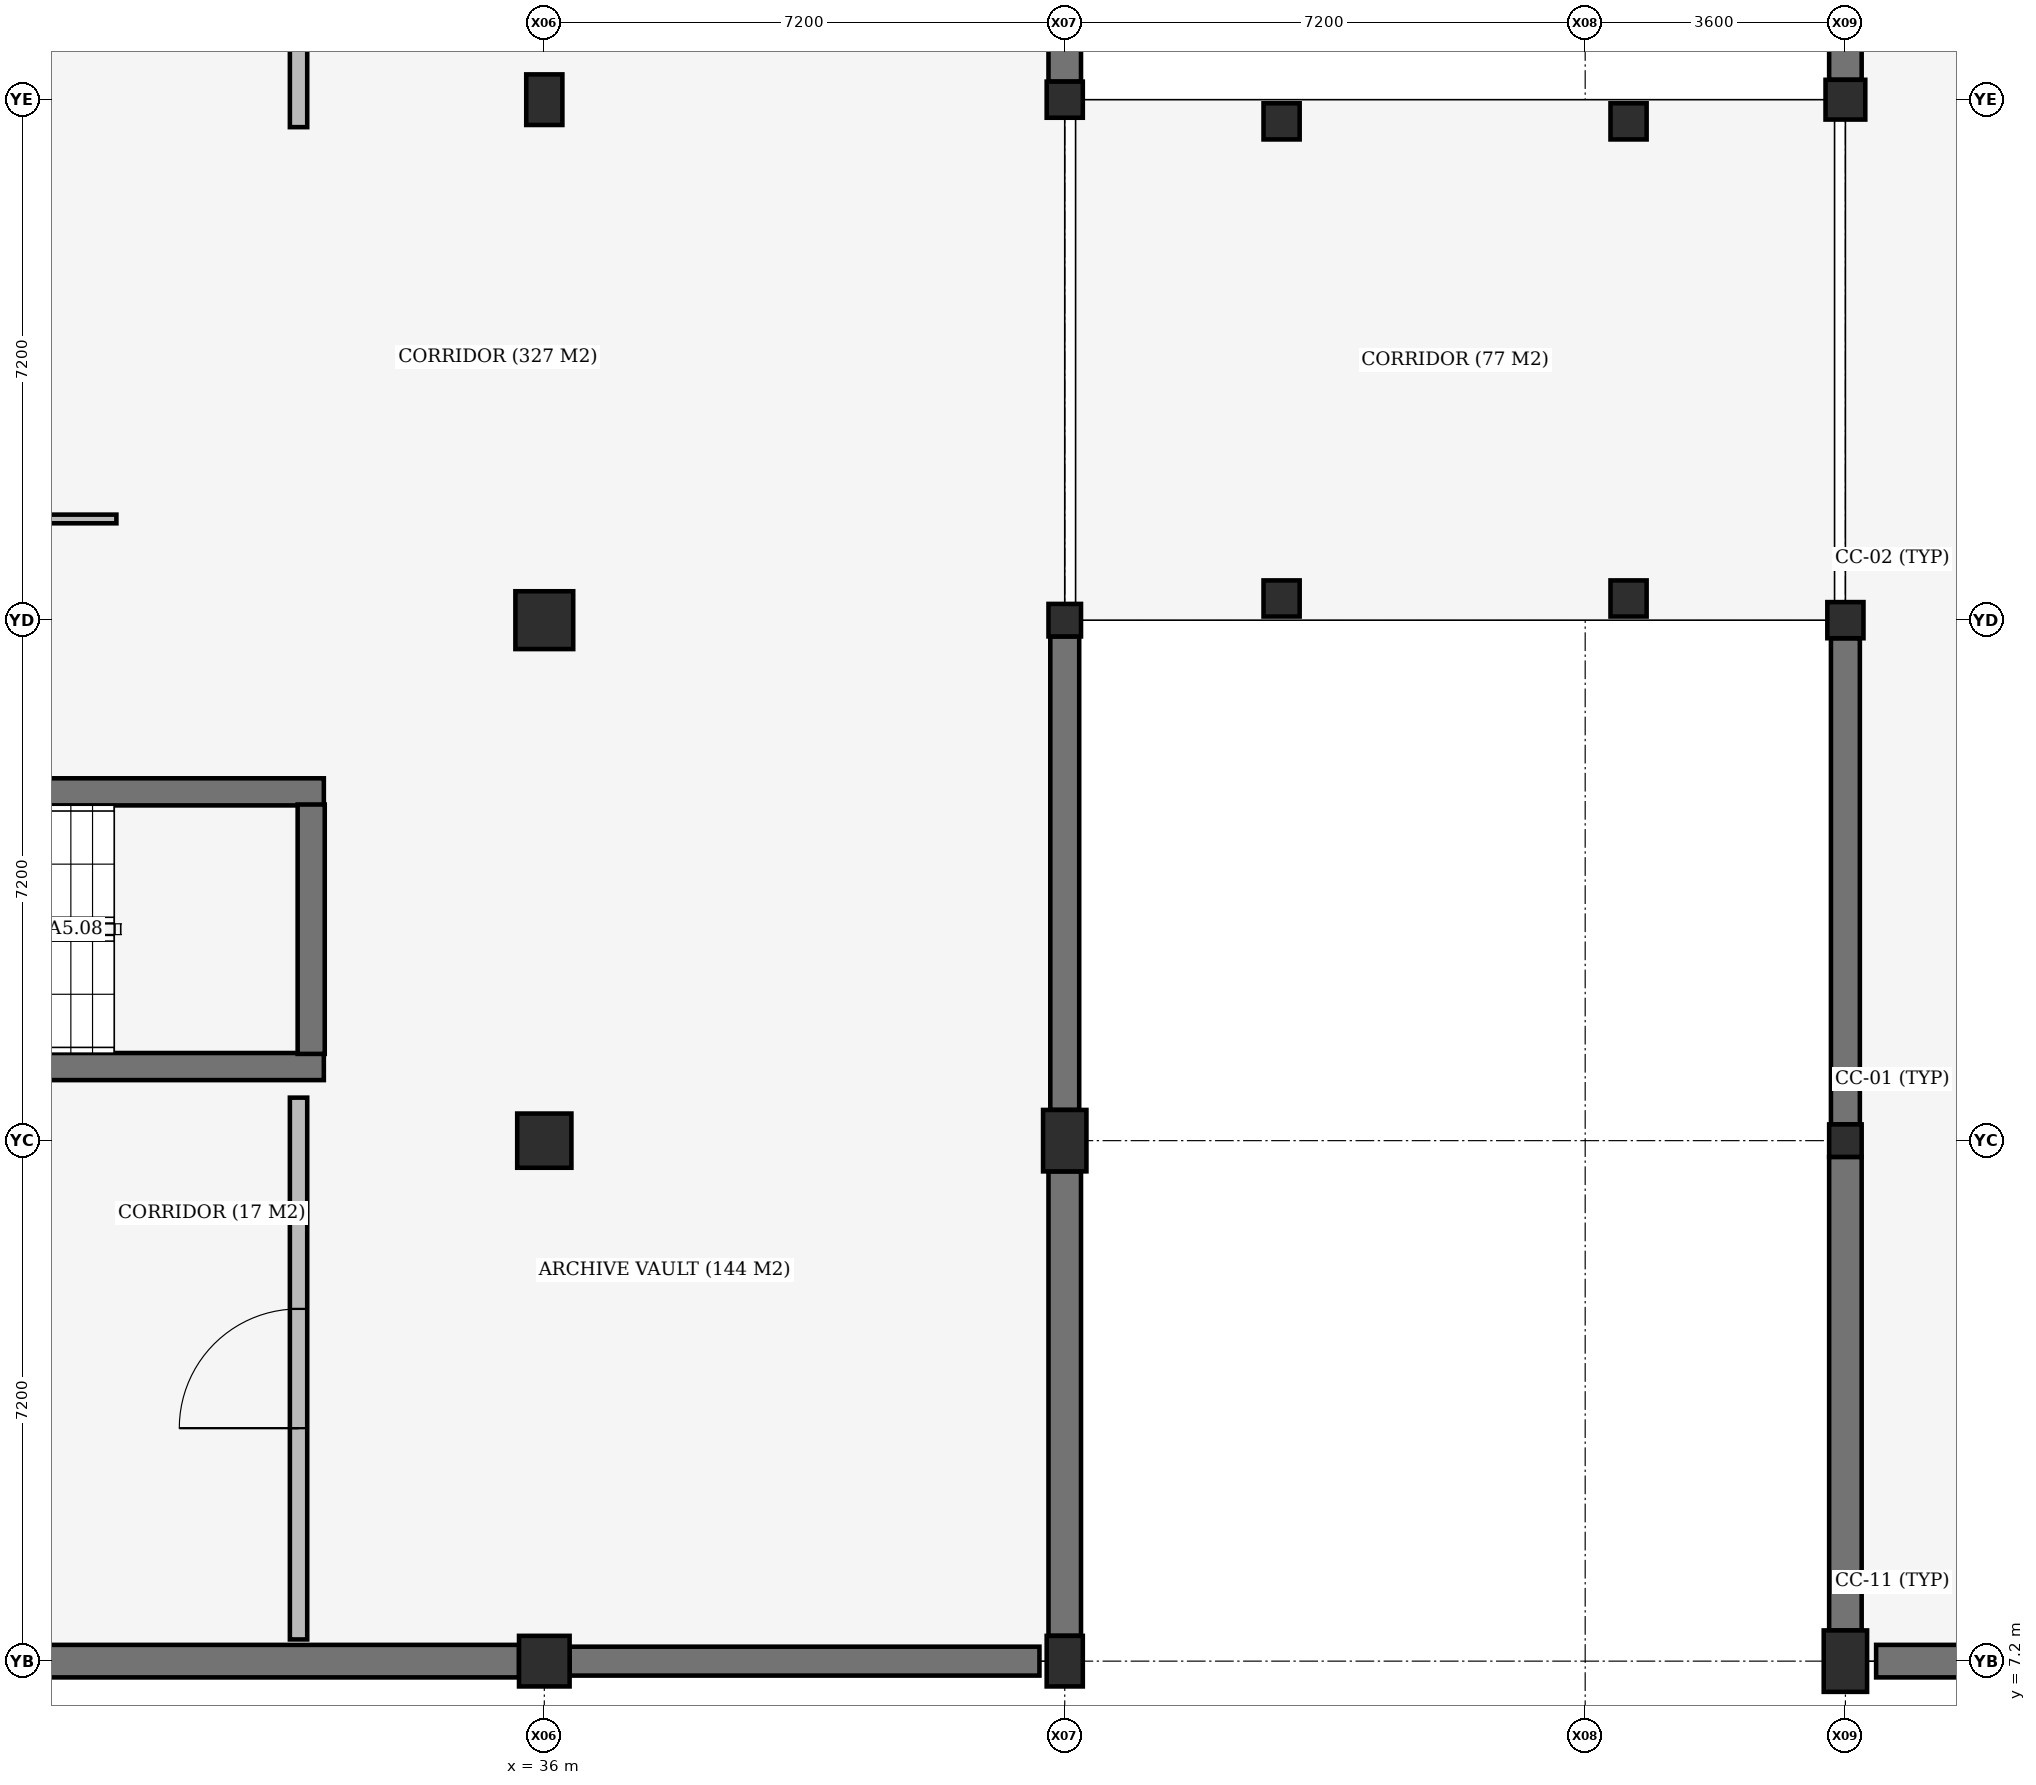
"""IFC4 building model, lengths in metres.
Left out: names, types, materials, properties, quantities, classifications, styles, units other than length and angle.
Written with IfcOpenShell. Run it as: python <this file> out.ifc"""

import sys

from ifc_helpers import new_model, si_unit, direction, frame, frame_2d, origin, origin_2d, place, context, subcontext, project, spatial, rectangle, extrude, element, fill, save


model = new_model("IFC4")
c1 = context("Model", 3, precision=1e-05, world=origin(), true_north=direction((0.0, 1.0)))
c2 = subcontext(c1, "Body", "Model", "MODEL_VIEW")
j1 = project(units=[si_unit("LENGTHUNIT", "METRE"), si_unit("PLANEANGLEUNIT", "RADIAN")], contexts=[c1])
p1 = place(None, origin())
s1 = spatial("IfcSite", under=j1, at=p1, CompositionType="ELEMENT")
p2 = place(p1, origin())
s2 = spatial("IfcBuilding", under=s1, at=p2, CompositionType="ELEMENT")
p3 = place(p2, frame((0.0, 0.0, -4.5)))
s3 = spatial("IfcBuildingStorey", under=s2, at=p3, CompositionType="ELEMENT", Elevation=-4.5)
p4 = place(p3, frame((54.0, 7.2, -0.42), z_axis=(0.0, 0.0, 1.0), x_axis=(1.0, 0.0, 0.0)))
e1 = element("IfcColumn", 1, at=p4, inside=s3, PredefinedType="COLUMN", context=c2, shape_type="SweptSolid", body=[
    extrude(rectangle(XDim=0.6, YDim=0.85, at=origin_2d()), origin(), (0.0, 0.0, 1.0), 4.6),
])
p5 = place(p3, frame((54.0, 14.4, -0.42), z_axis=(0.0, 0.0, 1.0), x_axis=(1.0, 0.0, 0.0)))
e2 = element("IfcColumn", 2, at=p5, inside=s3, PredefinedType="COLUMN", context=c2, shape_type="SweptSolid", body=[
    extrude(rectangle(XDim=0.45, YDim=0.45, at=origin_2d()), origin(), (0.0, 0.0, 1.0), 4.6),
])
p6 = place(p3, frame((54.0, 21.6, -0.42), z_axis=(0.0, 0.0, 1.0), x_axis=(1.0, 0.0, 0.0)))
e3 = element("IfcColumn", 3, at=p6, inside=s3, PredefinedType="COLUMN", context=c2, shape_type="SweptSolid", body=[
    extrude(rectangle(XDim=0.5, YDim=0.5, at=origin_2d()), origin(), (0.0, 0.0, 1.0), 4.6),
])
p7 = place(p3, frame((54.0, 28.8, -0.42), z_axis=(0.0, 0.0, 1.0), x_axis=(1.0, 0.0, 0.0)))
e4 = element("IfcColumn", 4, at=p7, inside=s3, PredefinedType="COLUMN", context=c2, shape_type="SweptSolid", body=[
    extrude(rectangle(XDim=0.55, YDim=0.55, at=origin_2d()), origin(), (0.0, 0.0, 1.0), 4.6),
])
p8 = place(p3, frame((36.0, 7.2, -0.42), z_axis=(0.0, 0.0, 1.0), x_axis=(1.0, 0.0, 0.0)))
e5 = element("IfcColumn", 5, at=p8, inside=s3, PredefinedType="COLUMN", context=c2, shape_type="SweptSolid", body=[
    extrude(rectangle(XDim=0.7, YDim=0.7, at=origin_2d()), origin(), (0.0, 0.0, 1.0), 4.6),
])
p9 = place(p3, frame((36.0, 14.4, -0.42), z_axis=(0.0, 0.0, 1.0), x_axis=(1.0, 0.0, 0.0)))
e6 = element("IfcColumn", 6, at=p9, inside=s3, PredefinedType="COLUMN", context=c2, shape_type="SweptSolid", body=[
    extrude(rectangle(XDim=0.75, YDim=0.75, at=origin_2d()), origin(), (0.0, 0.0, 1.0), 4.6),
])
p10 = place(p3, frame((36.0, 21.6, -0.42), z_axis=(0.0, 0.0, 1.0), x_axis=(1.0, 0.0, 0.0)))
e7 = element("IfcColumn", 7, at=p10, inside=s3, PredefinedType="COLUMN", context=c2, shape_type="SweptSolid", body=[
    extrude(rectangle(XDim=0.8, YDim=0.8, at=origin_2d()), origin(), (0.0, 0.0, 1.0), 4.6),
])
for number, where, z_axis, x_axis in (
    (8, (36.0, 28.8, -0.42), (0.0, 0.0, 1.0), (1.0, 0.0, 0.0)),
    (9, (43.2, 7.2, -0.42), (0.0, 0.0, 1.0), (1.0, 0.0, 0.0)),
):
    element("IfcColumn", number, at=place(p3, frame(where, z_axis=z_axis, x_axis=x_axis)), inside=s3, PredefinedType="COLUMN", context=c2, shape_type="SweptSolid", body=[
        extrude(rectangle(XDim=0.5, YDim=0.7, at=origin_2d()), origin(), (0.0, 0.0, 1.0), 4.6),
    ])
p11 = place(p3, frame((43.2, 14.4, -0.42), z_axis=(0.0, 0.0, 1.0), x_axis=(1.0, 0.0, 0.0)))
e10 = element("IfcColumn", 10, at=p11, inside=s3, PredefinedType="COLUMN", context=c2, shape_type="SweptSolid", body=[
    extrude(rectangle(XDim=0.6, YDim=0.85, at=origin_2d()), origin(), (0.0, 0.0, 1.0), 4.6),
])
p12 = place(p3, frame((43.2, 21.6, -0.42), z_axis=(0.0, 0.0, 1.0), x_axis=(1.0, 0.0, 0.0)))
e11 = element("IfcColumn", 11, at=p12, inside=s3, PredefinedType="COLUMN", context=c2, shape_type="SweptSolid", body=[
    extrude(rectangle(XDim=0.45, YDim=0.45, at=origin_2d()), origin(), (0.0, 0.0, 1.0), 4.6),
])
p13 = place(p3, frame((43.2, 28.8, -0.42), z_axis=(0.0, 0.0, 1.0), x_axis=(1.0, 0.0, 0.0)))
e12 = element("IfcColumn", 12, at=p13, inside=s3, PredefinedType="COLUMN", context=c2, shape_type="SweptSolid", body=[
    extrude(rectangle(XDim=0.5, YDim=0.5, at=origin_2d()), origin(), (0.0, 0.0, 1.0), 4.6),
])
for number, where, z_axis, x_axis in (
    (13, (46.2, 21.9, -0.38), (0.0, 0.0, 1.0), (1.0, 0.0, 0.0)),
    (14, (51.0, 21.9, -0.38), (0.0, 0.0, 1.0), (1.0, 0.0, 0.0)),
    (15, (46.2, 28.5, -0.38), (0.0, 0.0, 1.0), (1.0, 0.0, 0.0)),
    (16, (51.0, 28.5, -0.38), (0.0, 0.0, 1.0), (1.0, 0.0, 0.0)),
):
    element("IfcColumn", number, at=place(p3, frame(where, z_axis=z_axis, x_axis=x_axis)), inside=s3, PredefinedType="COLUMN", context=c2, shape_type="SweptSolid", body=[
        extrude(rectangle(XDim=0.5, YDim=0.5, at=origin_2d()), origin(), (0.0, 0.0, 1.0), 4.615),
    ])
for number, where, z_axis, x_axis in (
    (17, (23.85, 15.425, 0.0), (0.0, 0.0, 1.0), (1.0, 0.0, 0.0)),
    (18, (32.95, 19.225, 0.0), (0.0, 0.0, 1.0), (-1.0, 0.0, 0.0)),
):
    element("IfcWall", number, at=place(p3, frame(where, z_axis=z_axis, x_axis=x_axis)), inside=s3, PredefinedType="SHEAR", context=c2, shape_type="SweptSolid", body=[
        extrude(rectangle(XDim=9.1, YDim=0.375, at=frame_2d((4.55, 0.0))), origin(), (0.0, 0.0, 1.0), 4.18),
    ])
p14 = place(p3, frame((32.775, 15.6, 0.0), z_axis=(0.0, 0.0, 1.0), x_axis=(0.0, 1.0, 0.0)))
e19 = element("IfcWall", 19, at=p14, inside=s3, PredefinedType="SHEAR", context=c2, shape_type="SweptSolid", body=[
    extrude(rectangle(XDim=3.45, YDim=0.375, at=frame_2d((1.725, 0.0))), origin(), (0.0, 0.0, 1.0), 4.18),
])
p15 = place(p3, frame((54.425, 7.2, 0.0), z_axis=(0.0, 0.0, 1.0), x_axis=(1.0, 0.0, 0.0)))
e20 = element("IfcWall", 20, at=p15, inside=s3, PredefinedType="USERDEFINED", context=c2, shape_type="SweptSolid", body=[
    extrude(rectangle(XDim=7.65, YDim=0.45, at=frame_2d((3.825, 0.0))), origin(), (0.0, 0.0, 1.0), 4.18),
])
p16 = place(p3, frame((54.0, 7.625, 0.0), z_axis=(0.0, 0.0, 1.0), x_axis=(0.0, 1.0, 0.0)))
e21 = element("IfcWall", 21, at=p16, inside=s3, PredefinedType="USERDEFINED", context=c2, shape_type="SweptSolid", body=[
    extrude(rectangle(XDim=6.55, YDim=0.45, at=frame_2d((3.275, 0.0))), origin(), (0.0, 0.0, 1.0), 4.18),
])
p17 = place(p3, frame((54.0, 14.625, 0.0), z_axis=(0.0, 0.0, 1.0), x_axis=(0.0, 1.0, 0.0)))
e22 = element("IfcWall", 22, at=p17, inside=s3, PredefinedType="USERDEFINED", context=c2, shape_type="SweptSolid", body=[
    extrude(rectangle(XDim=6.725, YDim=0.4, at=frame_2d((3.363, 0.0))), origin(), (0.0, 0.0, 1.0), 4.18),
])
p18 = place(p3, frame((54.0, 29.075, 0.0), z_axis=(0.0, 0.0, 1.0), x_axis=(0.0, 1.0, 0.0)))
e23 = element("IfcWall", 23, at=p18, inside=s3, PredefinedType="USERDEFINED", context=c2, shape_type="SweptSolid", body=[
    extrude(rectangle(XDim=6.625, YDim=0.45, at=frame_2d((3.312, 0.0))), origin(), (0.0, 0.0, 1.0), 4.18),
])
p19 = place(p3, frame((29.075, 7.2, 0.0), z_axis=(0.0, 0.0, 1.0), x_axis=(1.0, 0.0, 0.0)))
e24 = element("IfcWall", 24, at=p19, inside=s3, PredefinedType="USERDEFINED", context=c2, shape_type="SweptSolid", body=[
    extrude(rectangle(XDim=6.575, YDim=0.45, at=frame_2d((3.288, 0.0))), origin(), (0.0, 0.0, 1.0), 4.18),
])
p20 = place(p3, frame((36.35, 7.2, 0.0), z_axis=(0.0, 0.0, 1.0), x_axis=(1.0, 0.0, 0.0)))
e25 = element("IfcWall", 25, at=p20, inside=s3, PredefinedType="USERDEFINED", context=c2, shape_type="SweptSolid", body=[
    extrude(rectangle(XDim=6.5, YDim=0.4, at=frame_2d((3.25, 0.0))), origin(), (0.0, 0.0, 1.0), 4.18),
])
p21 = place(p3, frame((43.2, 7.55, 0.0), z_axis=(0.0, 0.0, 1.0), x_axis=(0.0, 1.0, 0.0)))
e26 = element("IfcWall", 26, at=p21, inside=s3, PredefinedType="USERDEFINED", context=c2, shape_type="SweptSolid", body=[
    extrude(rectangle(XDim=6.425, YDim=0.45, at=frame_2d((3.212, 0.0))), origin(), (0.0, 0.0, 1.0), 4.18),
])
p22 = place(p3, frame((43.2, 14.825, 0.0), z_axis=(0.0, 0.0, 1.0), x_axis=(0.0, 1.0, 0.0)))
e27 = element("IfcWall", 27, at=p22, inside=s3, PredefinedType="USERDEFINED", context=c2, shape_type="SweptSolid", body=[
    extrude(rectangle(XDim=6.55, YDim=0.4, at=frame_2d((3.275, 0.0))), origin(), (0.0, 0.0, 1.0), 4.18),
])
p23 = place(p3, frame((43.2, 29.05, 0.0), z_axis=(0.0, 0.0, 1.0), x_axis=(0.0, 1.0, 0.0)))
e28 = element("IfcWall", 28, at=p23, inside=s3, PredefinedType="USERDEFINED", context=c2, shape_type="SweptSolid", body=[
    extrude(rectangle(XDim=6.675, YDim=0.45, at=frame_2d((3.337, 0.0))), origin(), (0.0, 0.0, 1.0), 4.18),
])
p24 = place(p3, frame((11.13, 23.0, 0.0), z_axis=(0.0, 0.0, 1.0), x_axis=(1.0, 0.0, 0.0)))
e29 = element("IfcWall", 29, at=p24, inside=s3, PredefinedType="PARTITIONING", context=c2, shape_type="SweptSolid", body=[
    extrude(rectangle(XDim=18.95, YDim=0.12, at=frame_2d((9.475, 0.0))), origin(), (0.0, 0.0, 1.0), 3.38),
])
p25 = place(p3, frame((32.6, 7.5, 0.0), z_axis=(0.0, 0.0, 1.0), x_axis=(0.0, 1.0, 0.0)))
e30 = element("IfcWall", 30, at=p25, inside=s3, PredefinedType="STANDARD", context=c2, shape_type="SweptSolid", body=[
    extrude(rectangle(XDim=7.495, YDim=0.24, at=frame_2d((3.748, 0.0))), origin(), (0.0, 0.0, 1.0), 3.48),
])
p26 = place(p25, frame((2.923, 0.0, 0.0)))
e31 = element("IfcOpeningElement", 31, at=p26, cuts=e30, PredefinedType="OPENING", context=c2, shape_type="SweptSolid", body=[
    extrude(rectangle(XDim=1.65, YDim=2.25, at=frame_2d((0.825, 1.125))), frame((0.0, 0.13, 0.0), z_axis=(0.0, -1.0, 0.0), x_axis=(1.0, 0.0, 0.0)), (0.0, 0.0, 1.0), 0.26),
])
p27 = place(p3, frame((32.6, 28.42, 0.0), z_axis=(0.0, 0.0, 1.0), x_axis=(0.0, 1.0, 0.0)))
e32 = element("IfcWall", 32, at=p27, inside=s3, PredefinedType="STANDARD", context=c2, shape_type="SweptSolid", body=[
    extrude(rectangle(XDim=13.955, YDim=0.24, at=frame_2d((6.978, 0.0))), origin(), (0.0, 0.0, 1.0), 3.38),
])
p28 = place(p27, frame((6.153, 0.0, 0.0)))
e33 = element("IfcOpeningElement", 33, at=p28, cuts=e32, PredefinedType="OPENING", context=c2, shape_type="SweptSolid", body=[
    extrude(rectangle(XDim=1.65, YDim=2.25, at=frame_2d((0.825, 1.125))), frame((0.0, 0.13, 0.0), z_axis=(0.0, -1.0, 0.0), x_axis=(1.0, 0.0, 0.0)), (0.0, 0.0, 1.0), 0.26),
])
p29 = place(p26, origin())
e34 = element("IfcDoor", 34, at=p29, inside=s3, OperationType="DOUBLE_DOOR_SINGLE_SWING", PredefinedType="DOOR", context=c2, shape_type="SweptSolid", body=[
    extrude(rectangle(XDim=1.65, YDim=2.25, at=frame_2d((0.825, 1.125))), frame((0.0, 0.025, 0.0), z_axis=(0.0, -1.0, 0.0), x_axis=(1.0, 0.0, 0.0)), (0.0, 0.0, 1.0), 0.05),
])
fill(e31, e34)
save(model, sys.argv[1])
